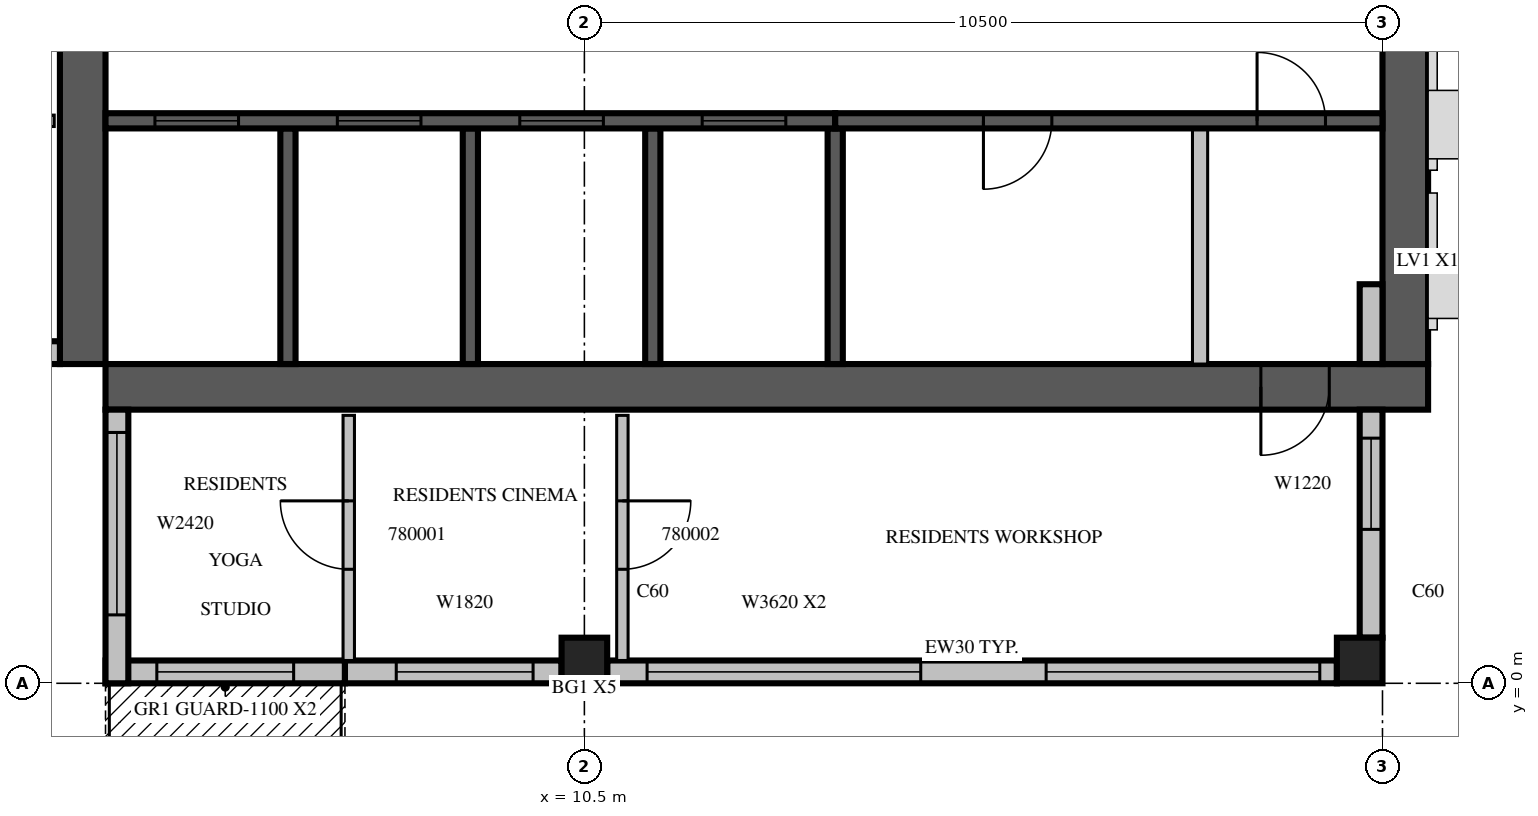
"""IFC4 building model, lengths in metres.
Left out: names, types, materials, properties, quantities, classifications, styles, units other than length and angle.
Written with IfcOpenShell. Run it as: python <this file> out.ifc"""

import sys

from ifc_helpers import new_model, si_unit, direction, frame, frame_2d, origin, origin_2d, place, context, subcontext, project, spatial, rectangle, extrude, source, transform, mapped, element, fill, save


model = new_model("IFC4")
c1 = context("Model", 3, precision=1e-05, world=origin(), true_north=direction((0.0, 1.0)))
c2 = subcontext(c1, "Body", "Model", "MODEL_VIEW")
j1 = project(units=[si_unit("LENGTHUNIT", "METRE"), si_unit("PLANEANGLEUNIT", "RADIAN")], contexts=[c1])
p1 = place(None, origin())
s1 = spatial("IfcSite", under=j1, at=p1, CompositionType="ELEMENT")
p2 = place(p1, origin())
s2 = spatial("IfcBuilding", under=s1, at=p2, CompositionType="ELEMENT")
p3 = place(p2, frame((0.0, 0.0, 340.5)))
s3 = spatial("IfcBuildingStorey", under=s2, at=p3, CompositionType="ELEMENT", Elevation=340.5)
m1 = source(origin(), c2, "Body", "SweptSolid", [
    extrude(rectangle(XDim=0.6, YDim=0.6, at=origin_2d()), origin(), (0.0, 0.0, 1.0), 3.5),
])
for number, where, z_axis, x_axis in (
    (1, (10.5, 0.3, 0.0), (0.0, 0.0, 1.0), (1.0, 0.0, 0.0)),
    (2, (20.7, 0.3, 0.0), (0.0, 0.0, 1.0), (1.0, 0.0, 0.0)),
):
    element("IfcColumn", number, at=place(p3, frame(where, z_axis=z_axis, x_axis=x_axis)), inside=s3, PredefinedType="COLUMN", context=c2, shape_type="MappedRepresentation", body=[
        mapped(m1, transform((0.0, 0.0, 0.0), scale=1.0)),
    ])
m2 = source(origin(), c2, "Body", "SweptSolid", [
    extrude(rectangle(XDim=17.4, YDim=0.6, at=frame_2d((8.7, 0.0))), origin(), (0.0, 0.0, 1.0), 3.5),
])
p4 = place(p3, frame((3.9, 4.2, 0.0), z_axis=(0.0, 0.0, 1.0), x_axis=(0.0, 1.0, 0.0)))
e3 = element("IfcWall", 3, at=p4, inside=s3, PredefinedType="SHEAR", context=c2, shape_type="MappedRepresentation", body=[
    mapped(m2, transform((0.0, 0.0, 0.0), scale=1.0)),
])
m3 = source(origin(), c2, "Body", "SweptSolid", [
    extrude(rectangle(XDim=2.2, YDim=2.1, at=frame_2d((1.1, 1.05))), frame((0.0, 0.31, 0.0), z_axis=(0.0, -1.0, 0.0), x_axis=(1.0, 0.0, 0.0)), (0.0, 0.0, 1.0), 0.62),
])
p5 = place(p4, frame((4.2, 0.0, 0.0)))
e4 = element("IfcOpeningElement", 4, at=p5, cuts=e3, PredefinedType="OPENING", context=c2, shape_type="MappedRepresentation", body=[
    mapped(m3, transform((0.0, 0.0, 0.0), scale=1.0)),
])
p6 = place(p3, frame((4.2, 3.9, 0.0), z_axis=(0.0, 0.0, 1.0), x_axis=(1.0, 0.0, 0.0)))
e5 = element("IfcWall", 5, at=p6, inside=s3, PredefinedType="SHEAR", context=c2, shape_type="MappedRepresentation", body=[
    mapped(m2, transform((0.0, 0.0, 0.0), scale=1.0)),
])
m4 = source(origin(), c2, "Body", "SweptSolid", [
    extrude(rectangle(XDim=0.9, YDim=2.1, at=frame_2d((0.45, 1.05))), frame((0.0, 0.31, 0.0), z_axis=(0.0, -1.0, 0.0), x_axis=(1.0, 0.0, 0.0)), (0.0, 0.0, 1.0), 0.62),
])
p7 = place(p6, frame((15.2, 0.0, 0.0)))
e6 = element("IfcOpeningElement", 6, at=p7, cuts=e5, PredefinedType="OPENING", context=c2, shape_type="MappedRepresentation", body=[
    mapped(m4, transform((0.0, 0.0, 0.0), scale=1.0)),
])
m5 = source(origin(), c2, "Body", "SweptSolid", [
    extrude(rectangle(XDim=16.8, YDim=0.6, at=frame_2d((8.4, 0.0))), origin(), (0.0, 0.0, 1.0), 3.5),
])
p8 = place(p3, frame((21.3, 4.2, 0.0), z_axis=(0.0, 0.0, 1.0), x_axis=(0.0, 1.0, 0.0)))
e7 = element("IfcWall", 7, at=p8, inside=s3, PredefinedType="SHEAR", context=c2, shape_type="MappedRepresentation", body=[
    mapped(m5, transform((0.0, 0.0, 0.0), scale=1.0)),
])
m6 = source(origin(), c2, "Body", "SweptSolid", [
    extrude(rectangle(XDim=1.2, YDim=2.4, at=frame_2d((0.6, 1.2))), frame((0.0, 0.31, 0.0), z_axis=(0.0, -1.0, 0.0), x_axis=(1.0, 0.0, 0.0)), (0.0, 0.0, 1.0), 0.62),
])
p9 = place(p8, frame((12.0, 0.0, 0.6)))
e8 = element("IfcOpeningElement", 8, at=p9, cuts=e7, PredefinedType="OPENING", context=c2, shape_type="MappedRepresentation", body=[
    mapped(m6, transform((0.0, 0.0, 0.0), scale=1.0)),
])
m7 = source(origin(), c2, "Body", "SweptSolid", [
    extrude(rectangle(XDim=3.15, YDim=0.3, at=frame_2d((1.575, 0.0))), origin(), (0.0, 0.0, 1.0), 3.1),
])
p10 = place(p3, frame((4.2, 0.15, 0.0), z_axis=(0.0, 0.0, 1.0), x_axis=(1.0, 0.0, 0.0)))
e9 = element("IfcWall", 9, at=p10, inside=s3, PredefinedType="STANDARD", context=c2, shape_type="MappedRepresentation", body=[
    mapped(m7, transform((0.0, 0.0, 0.0), scale=1.0)),
])
m8 = source(origin(), c2, "Body", "SweptSolid", [
    extrude(rectangle(XDim=1.8, YDim=2.4, at=frame_2d((0.9, 1.2))), frame((0.0, 0.16, 0.0), z_axis=(0.0, -1.0, 0.0), x_axis=(1.0, 0.0, 0.0)), (0.0, 0.0, 1.0), 0.32),
])
p11 = place(p10, frame((0.675, 0.0, 0.0)))
e10 = element("IfcOpeningElement", 10, at=p11, cuts=e9, PredefinedType="OPENING", context=c2, shape_type="MappedRepresentation", body=[
    mapped(m8, transform((0.0, 0.0, 0.0), scale=1.0)),
])
m9 = source(origin(), c2, "Body", "SweptSolid", [
    extrude(rectangle(XDim=2.85, YDim=0.3, at=frame_2d((1.425, 0.0))), origin(), (0.0, 0.0, 1.0), 3.1),
])
p12 = place(p3, frame((7.35, 0.15, 0.0), z_axis=(0.0, 0.0, 1.0), x_axis=(1.0, 0.0, 0.0)))
e11 = element("IfcWall", 11, at=p12, inside=s3, PredefinedType="STANDARD", context=c2, shape_type="MappedRepresentation", body=[
    mapped(m9, transform((0.0, 0.0, 0.0), scale=1.0)),
])
m10 = source(origin(), c2, "Body", "SweptSolid", [
    extrude(rectangle(XDim=1.8, YDim=2.0, at=frame_2d((0.9, 1.0))), frame((0.0, 0.16, 0.0), z_axis=(0.0, -1.0, 0.0), x_axis=(1.0, 0.0, 0.0)), (0.0, 0.0, 1.0), 0.32),
])
p13 = place(p12, frame((0.675, 0.0, 0.6)))
e12 = element("IfcOpeningElement", 12, at=p13, cuts=e11, PredefinedType="OPENING", context=c2, shape_type="MappedRepresentation", body=[
    mapped(m10, transform((0.0, 0.0, 0.0), scale=1.0)),
])
m11 = source(origin(), c2, "Body", "SweptSolid", [
    extrude(rectangle(XDim=9.6, YDim=0.3, at=frame_2d((4.8, 0.0))), origin(), (0.0, 0.0, 1.0), 3.1),
])
p14 = place(p3, frame((10.8, 0.15, 0.0), z_axis=(0.0, 0.0, 1.0), x_axis=(1.0, 0.0, 0.0)))
e13 = element("IfcWall", 13, at=p14, inside=s3, PredefinedType="STANDARD", context=c2, shape_type="MappedRepresentation", body=[
    mapped(m11, transform((0.0, 0.0, 0.0), scale=1.0)),
])
m12 = source(origin(), c2, "Body", "SweptSolid", [
    extrude(rectangle(XDim=3.6, YDim=2.0, at=frame_2d((1.8, 1.0))), frame((0.0, 0.16, 0.0), z_axis=(0.0, -1.0, 0.0), x_axis=(1.0, 0.0, 0.0)), (0.0, 0.0, 1.0), 0.32),
])
p15 = place(p14, frame((0.525, 0.0, 0.6)))
e14 = element("IfcOpeningElement", 14, at=p15, cuts=e13, PredefinedType="OPENING", context=c2, shape_type="MappedRepresentation", body=[
    mapped(m12, transform((0.0, 0.0, 0.0), scale=1.0)),
])
p16 = place(p14, frame((5.775, 0.0, 0.6)))
e15 = element("IfcOpeningElement", 15, at=p16, cuts=e13, PredefinedType="OPENING", context=c2, shape_type="MappedRepresentation", body=[
    mapped(m12, transform((0.0, 0.0, 0.0), scale=1.0)),
])
m13 = source(origin(), c2, "Body", "SweptSolid", [
    extrude(rectangle(XDim=3.0, YDim=0.3, at=frame_2d((1.5, 0.0))), origin(), (0.0, 0.0, 1.0), 3.1),
])
p17 = place(p3, frame((20.85, 0.6, 0.0), z_axis=(0.0, 0.0, 1.0), x_axis=(0.0, 1.0, 0.0)))
e16 = element("IfcWall", 16, at=p17, inside=s3, PredefinedType="STANDARD", context=c2, shape_type="MappedRepresentation", body=[
    mapped(m13, transform((0.0, 0.0, 0.0), scale=1.0)),
])
m14 = source(origin(), c2, "Body", "SweptSolid", [
    extrude(rectangle(XDim=1.2, YDim=2.0, at=frame_2d((0.6, 1.0))), frame((0.0, 0.16, 0.0), z_axis=(0.0, -1.0, 0.0), x_axis=(1.0, 0.0, 0.0)), (0.0, 0.0, 1.0), 0.32),
])
p18 = place(p17, frame((1.425, 0.0, 0.6)))
e17 = element("IfcOpeningElement", 17, at=p18, cuts=e16, PredefinedType="OPENING", context=c2, shape_type="MappedRepresentation", body=[
    mapped(m14, transform((0.0, 0.0, 0.0), scale=1.0)),
])
m15 = source(origin(), c2, "Body", "SweptSolid", [
    extrude(rectangle(XDim=1.05, YDim=0.3, at=frame_2d((0.525, 0.0))), origin(), (0.0, 0.0, 1.0), 3.1),
])
p19 = place(p3, frame((20.85, 4.2, 0.0), z_axis=(0.0, 0.0, 1.0), x_axis=(0.0, 1.0, 0.0)))
e18 = element("IfcWall", 18, at=p19, inside=s3, PredefinedType="STANDARD", context=c2, shape_type="MappedRepresentation", body=[
    mapped(m15, transform((0.0, 0.0, 0.0), scale=1.0)),
])
m16 = source(origin(), c2, "Body", "SweptSolid", [
    extrude(rectangle(XDim=3.6, YDim=0.3, at=frame_2d((1.8, 0.0))), origin(), (0.0, 0.0, 1.0), 3.1),
])
p20 = place(p3, frame((0.0, 4.35, 0.0), z_axis=(0.0, 0.0, 1.0), x_axis=(1.0, 0.0, 0.0)))
e19 = element("IfcWall", 19, at=p20, inside=s3, PredefinedType="STANDARD", context=c2, shape_type="MappedRepresentation", body=[
    mapped(m16, transform((0.0, 0.0, 0.0), scale=1.0)),
])
m17 = source(origin(), c2, "Body", "SweptSolid", [
    extrude(rectangle(XDim=2.4, YDim=2.0, at=frame_2d((1.2, 1.0))), frame((0.0, 0.16, 0.0), z_axis=(0.0, -1.0, 0.0), x_axis=(1.0, 0.0, 0.0)), (0.0, 0.0, 1.0), 0.32),
])
p21 = place(p20, frame((0.9, 0.0, 0.6)))
e20 = element("IfcOpeningElement", 20, at=p21, cuts=e19, PredefinedType="OPENING", context=c2, shape_type="MappedRepresentation", body=[
    mapped(m17, transform((0.0, 0.0, 0.0), scale=1.0)),
])
p22 = place(p3, frame((4.35, 3.6, 0.0), z_axis=(0.0, 0.0, 1.0), x_axis=(0.0, -1.0, 0.0)))
e21 = element("IfcWall", 21, at=p22, inside=s3, PredefinedType="STANDARD", context=c2, shape_type="MappedRepresentation", body=[
    mapped(m16, transform((0.0, 0.0, 0.0), scale=1.0)),
])
p23 = place(p22, frame((0.3, 0.0, 0.6)))
e22 = element("IfcOpeningElement", 22, at=p23, cuts=e21, PredefinedType="OPENING", context=c2, shape_type="MappedRepresentation", body=[
    mapped(m17, transform((0.0, 0.0, 0.0), scale=1.0)),
])
m18 = source(origin(), c2, "Body", "SweptSolid", [
    extrude(rectangle(XDim=3.1, YDim=0.2, at=frame_2d((1.55, 0.0))), origin(), (0.0, 0.0, 1.0), 3.5),
])
for number, where, z_axis, x_axis in (
    (23, (6.6, 4.2, 0.0), (0.0, 0.0, 1.0), (0.0, 1.0, 0.0)),
    (24, (9.0, 4.2, 0.0), (0.0, 0.0, 1.0), (0.0, 1.0, 0.0)),
    (25, (11.4, 4.2, 0.0), (0.0, 0.0, 1.0), (0.0, 1.0, 0.0)),
):
    element("IfcWall", number, at=place(p3, frame(where, z_axis=z_axis, x_axis=x_axis)), inside=s3, PredefinedType="SOLIDWALL", context=c2, shape_type="MappedRepresentation", body=[
        mapped(m18, transform((0.0, 0.0, 0.0), scale=1.0)),
    ])
m19 = source(origin(), c2, "Body", "SweptSolid", [
    extrude(rectangle(XDim=3.1, YDim=0.2, at=frame_2d((1.55, 0.0))), origin(), (0.0, 0.0, 1.0), 3.1),
])
p24 = place(p3, frame((13.8, 4.2, 0.0), z_axis=(0.0, 0.0, 1.0), x_axis=(0.0, 1.0, 0.0)))
e26 = element("IfcWall", 26, at=p24, inside=s3, PredefinedType="SOLIDWALL", context=c2, shape_type="MappedRepresentation", body=[
    mapped(m19, transform((0.0, 0.0, 0.0), scale=1.0)),
])
m20 = source(origin(), c2, "Body", "SweptSolid", [
    extrude(rectangle(XDim=3.1, YDim=0.2, at=frame_2d((1.55, 0.0))), origin(), (0.0, 0.0, 1.0), 3.1),
])
p25 = place(p3, frame((18.6, 4.2, 0.0), z_axis=(0.0, 0.0, 1.0), x_axis=(0.0, 1.0, 0.0)))
e27 = element("IfcWall", 27, at=p25, inside=s3, PredefinedType="PARTITIONING", context=c2, shape_type="MappedRepresentation", body=[
    mapped(m20, transform((0.0, 0.0, 0.0), scale=1.0)),
])
m21 = source(origin(), c2, "Body", "SweptSolid", [
    extrude(rectangle(XDim=9.6, YDim=0.2, at=frame_2d((4.8, 0.0))), origin(), (0.0, 0.0, 1.0), 3.5),
])
p26 = place(p3, frame((4.2, 7.4, 0.0), z_axis=(0.0, 0.0, 1.0), x_axis=(1.0, 0.0, 0.0)))
e28 = element("IfcWall", 28, at=p26, inside=s3, PredefinedType="SOLIDWALL", context=c2, shape_type="MappedRepresentation", body=[
    mapped(m21, transform((0.0, 0.0, 0.0), scale=1.0)),
])
m22 = source(origin(), c2, "Body", "SweptSolid", [
    extrude(rectangle(XDim=1.1, YDim=2.1, at=frame_2d((0.55, 1.05))), frame((0.0, 0.11, 0.0), z_axis=(0.0, -1.0, 0.0), x_axis=(1.0, 0.0, 0.0)), (0.0, 0.0, 1.0), 0.22),
])
p27 = place(p26, frame((0.65, 0.0, 0.0)))
e29 = element("IfcOpeningElement", 29, at=p27, cuts=e28, PredefinedType="OPENING", context=c2, shape_type="MappedRepresentation", body=[
    mapped(m22, transform((0.0, 0.0, 0.0), scale=1.0)),
])
p28 = place(p26, frame((3.05, 0.0, 0.0)))
e30 = element("IfcOpeningElement", 30, at=p28, cuts=e28, PredefinedType="OPENING", context=c2, shape_type="MappedRepresentation", body=[
    mapped(m22, transform((0.0, 0.0, 0.0), scale=1.0)),
])
p29 = place(p26, frame((5.45, 0.0, 0.0)))
e31 = element("IfcOpeningElement", 31, at=p29, cuts=e28, PredefinedType="OPENING", context=c2, shape_type="MappedRepresentation", body=[
    mapped(m22, transform((0.0, 0.0, 0.0), scale=1.0)),
])
p30 = place(p26, frame((7.85, 0.0, 0.0)))
e32 = element("IfcOpeningElement", 32, at=p30, cuts=e28, PredefinedType="OPENING", context=c2, shape_type="MappedRepresentation", body=[
    mapped(m22, transform((0.0, 0.0, 0.0), scale=1.0)),
])
m23 = source(origin(), c2, "Body", "SweptSolid", [
    extrude(rectangle(XDim=7.2, YDim=0.2, at=frame_2d((3.6, 0.0))), origin(), (0.0, 0.0, 1.0), 3.1),
])
p31 = place(p3, frame((13.8, 7.4, 0.0), z_axis=(0.0, 0.0, 1.0), x_axis=(1.0, 0.0, 0.0)))
e33 = element("IfcWall", 33, at=p31, inside=s3, PredefinedType="SOLIDWALL", context=c2, shape_type="MappedRepresentation", body=[
    mapped(m23, transform((0.0, 0.0, 0.0), scale=1.0)),
])
m24 = source(origin(), c2, "Body", "SweptSolid", [
    extrude(rectangle(XDim=0.9, YDim=2.1, at=frame_2d((0.45, 1.05))), frame((0.0, 0.11, 0.0), z_axis=(0.0, -1.0, 0.0), x_axis=(1.0, 0.0, 0.0)), (0.0, 0.0, 1.0), 0.22),
])
p32 = place(p31, frame((1.95, 0.0, 0.0)))
e34 = element("IfcOpeningElement", 34, at=p32, cuts=e33, PredefinedType="OPENING", context=c2, shape_type="MappedRepresentation", body=[
    mapped(m24, transform((0.0, 0.0, 0.0), scale=1.0)),
])
p33 = place(p31, frame((5.55, 0.0, 0.0)))
e35 = element("IfcOpeningElement", 35, at=p33, cuts=e33, PredefinedType="OPENING", context=c2, shape_type="MappedRepresentation", body=[
    mapped(m24, transform((0.0, 0.0, 0.0), scale=1.0)),
])
m25 = source(origin(), c2, "Body", "SweptSolid", [
    extrude(rectangle(XDim=3.225, YDim=0.15, at=frame_2d((1.613, 0.0))), origin(), (0.0, 0.0, 1.0), 3.1),
])
p34 = place(p3, frame((7.4, 3.525, 0.0), z_axis=(0.0, 0.0, 1.0), x_axis=(0.0, -1.0, 0.0)))
e36 = element("IfcWall", 36, at=p34, inside=s3, PredefinedType="PARTITIONING", context=c2, shape_type="MappedRepresentation", body=[
    mapped(m25, transform((0.0, 0.0, 0.0), scale=1.0)),
])
m26 = source(origin(), c2, "Body", "SweptSolid", [
    extrude(rectangle(XDim=0.9, YDim=2.1, at=frame_2d((0.45, 1.05))), frame((0.0, 0.085, 0.0), z_axis=(0.0, -1.0, 0.0), x_axis=(1.0, 0.0, 0.0)), (0.0, 0.0, 1.0), 0.17),
])
p35 = place(p34, frame((1.125, 0.0, 0.0)))
e37 = element("IfcOpeningElement", 37, at=p35, cuts=e36, PredefinedType="OPENING", context=c2, shape_type="MappedRepresentation", body=[
    mapped(m26, transform((0.0, 0.0, 0.0), scale=1.0)),
])
p36 = place(p3, frame((11.0, 3.525, 0.0), z_axis=(0.0, 0.0, 1.0), x_axis=(0.0, -1.0, 0.0)))
e38 = element("IfcWall", 38, at=p36, inside=s3, PredefinedType="PARTITIONING", context=c2, shape_type="MappedRepresentation", body=[
    mapped(m25, transform((0.0, 0.0, 0.0), scale=1.0)),
])
p37 = place(p36, frame((1.125, 0.0, 0.0)))
e39 = element("IfcOpeningElement", 39, at=p37, cuts=e38, PredefinedType="OPENING", context=c2, shape_type="MappedRepresentation", body=[
    mapped(m26, transform((0.0, 0.0, 0.0), scale=1.0)),
])
p38 = place(p3, frame((0.3, 7.4, 0.0), z_axis=(0.0, 0.0, 1.0), x_axis=(1.0, 0.0, 0.0)))
e40 = element("IfcWall", 40, at=p38, inside=s3, PredefinedType="PARTITIONING", context=c2, shape_type="MappedRepresentation", body=[
    mapped(m25, transform((0.0, 0.0, 0.0), scale=1.0)),
])
p39 = place(p38, frame((1.2, 0.0, 0.0)))
e41 = element("IfcOpeningElement", 41, at=p39, cuts=e40, PredefinedType="OPENING", context=c2, shape_type="MappedRepresentation", body=[
    mapped(m26, transform((0.0, 0.0, 0.0), scale=1.0)),
])
m27 = source(origin(), c2, "Body", "SweptSolid", [
    extrude(rectangle(XDim=1.8, YDim=2.4, at=frame_2d((0.9, 1.2))), frame((0.0, 0.025, 0.0), z_axis=(0.0, -1.0, 0.0), x_axis=(1.0, 0.0, 0.0)), (0.0, 0.0, 1.0), 0.05),
])
p40 = place(p11, origin())
e42 = element("IfcDoor", 42, at=p40, inside=s3, OperationType="SLIDING_TO_LEFT", PredefinedType="DOOR", context=c2, shape_type="MappedRepresentation", body=[
    mapped(m27, transform((0.0, 0.0, 0.0), scale=1.0)),
])
fill(e10, e42)
m28 = source(origin(), c2, "Body", "SweptSolid", [
    extrude(rectangle(XDim=1.8, YDim=2.0, at=frame_2d((0.9, 1.0))), frame((0.0, 0.03, 0.0), z_axis=(0.0, -1.0, 0.0), x_axis=(1.0, 0.0, 0.0)), (0.0, 0.0, 1.0), 0.06),
])
p41 = place(p13, origin())
e43 = element("IfcWindow", 43, at=p41, inside=s3, PartitioningType="SINGLE_PANEL", PredefinedType="WINDOW", context=c2, shape_type="MappedRepresentation", body=[
    mapped(m28, transform((0.0, 0.0, 0.0), scale=1.0)),
])
fill(e12, e43)
m29 = source(origin(), c2, "Body", "SweptSolid", [
    extrude(rectangle(XDim=3.6, YDim=2.0, at=frame_2d((1.8, 1.0))), frame((0.0, 0.03, 0.0), z_axis=(0.0, -1.0, 0.0), x_axis=(1.0, 0.0, 0.0)), (0.0, 0.0, 1.0), 0.06),
])
p42 = place(p15, origin())
e44 = element("IfcWindow", 44, at=p42, inside=s3, PartitioningType="SINGLE_PANEL", PredefinedType="WINDOW", context=c2, shape_type="MappedRepresentation", body=[
    mapped(m29, transform((0.0, 0.0, 0.0), scale=1.0)),
])
fill(e14, e44)
p43 = place(p16, origin())
e45 = element("IfcWindow", 45, at=p43, inside=s3, PartitioningType="SINGLE_PANEL", PredefinedType="WINDOW", context=c2, shape_type="MappedRepresentation", body=[
    mapped(m29, transform((0.0, 0.0, 0.0), scale=1.0)),
])
fill(e15, e45)
m30 = source(origin(), c2, "Body", "SweptSolid", [
    extrude(rectangle(XDim=1.2, YDim=2.0, at=frame_2d((0.6, 1.0))), frame((0.0, 0.03, 0.0), z_axis=(0.0, -1.0, 0.0), x_axis=(1.0, 0.0, 0.0)), (0.0, 0.0, 1.0), 0.06),
])
p44 = place(p18, origin())
e46 = element("IfcWindow", 46, at=p44, inside=s3, PartitioningType="SINGLE_PANEL", PredefinedType="WINDOW", context=c2, shape_type="MappedRepresentation", body=[
    mapped(m30, transform((0.0, 0.0, 0.0), scale=1.0)),
])
fill(e17, e46)
m31 = source(origin(), c2, "Body", "SweptSolid", [
    extrude(rectangle(XDim=2.4, YDim=2.0, at=frame_2d((1.2, 1.0))), frame((0.0, 0.03, 0.0), z_axis=(0.0, -1.0, 0.0), x_axis=(1.0, 0.0, 0.0)), (0.0, 0.0, 1.0), 0.06),
])
p45 = place(p23, origin())
e47 = element("IfcWindow", 47, at=p45, inside=s3, PartitioningType="SINGLE_PANEL", PredefinedType="WINDOW", context=c2, shape_type="MappedRepresentation", body=[
    mapped(m31, transform((0.0, 0.0, 0.0), scale=1.0)),
])
fill(e22, e47)
m32 = source(origin(), c2, "Body", "SweptSolid", [
    extrude(rectangle(XDim=1.1, YDim=2.1, at=frame_2d((0.55, 1.05))), frame((0.0, 0.025, 0.0), z_axis=(0.0, -1.0, 0.0), x_axis=(1.0, 0.0, 0.0)), (0.0, 0.0, 1.0), 0.05),
])
p46 = place(p27, origin())
e48 = element("IfcDoor", 48, at=p46, inside=s3, OperationType="SLIDING_TO_LEFT", PredefinedType="DOOR", context=c2, shape_type="MappedRepresentation", body=[
    mapped(m32, transform((0.0, 0.0, 0.0), scale=1.0)),
])
fill(e29, e48)
p47 = place(p28, origin())
e49 = element("IfcDoor", 49, at=p47, inside=s3, OperationType="SLIDING_TO_LEFT", PredefinedType="DOOR", context=c2, shape_type="MappedRepresentation", body=[
    mapped(m32, transform((0.0, 0.0, 0.0), scale=1.0)),
])
fill(e30, e49)
p48 = place(p29, origin())
e50 = element("IfcDoor", 50, at=p48, inside=s3, OperationType="SLIDING_TO_LEFT", PredefinedType="DOOR", context=c2, shape_type="MappedRepresentation", body=[
    mapped(m32, transform((0.0, 0.0, 0.0), scale=1.0)),
])
fill(e31, e50)
p49 = place(p30, origin())
e51 = element("IfcDoor", 51, at=p49, inside=s3, OperationType="SLIDING_TO_LEFT", PredefinedType="DOOR", context=c2, shape_type="MappedRepresentation", body=[
    mapped(m32, transform((0.0, 0.0, 0.0), scale=1.0)),
])
fill(e32, e51)
m33 = source(origin(), c2, "Body", "SweptSolid", [
    extrude(rectangle(XDim=0.9, YDim=2.1, at=frame_2d((0.45, 1.05))), frame((0.0, 0.025, 0.0), z_axis=(0.0, -1.0, 0.0), x_axis=(1.0, 0.0, 0.0)), (0.0, 0.0, 1.0), 0.05),
])
p50 = place(p32, origin())
e52 = element("IfcDoor", 52, at=p50, inside=s3, OperationType="SINGLE_SWING_RIGHT", PredefinedType="DOOR", context=c2, shape_type="MappedRepresentation", body=[
    mapped(m33, transform((0.0, 0.0, 0.0), scale=1.0)),
])
fill(e34, e52)
p51 = place(p33, origin())
e53 = element("IfcDoor", 53, at=p51, inside=s3, OperationType="SINGLE_SWING_LEFT", PredefinedType="DOOR", context=c2, shape_type="MappedRepresentation", body=[
    mapped(m33, transform((0.0, 0.0, 0.0), scale=1.0)),
])
fill(e35, e53)
p52 = place(p7, origin())
e54 = element("IfcDoor", 54, at=p52, inside=s3, OperationType="SINGLE_SWING_RIGHT", PredefinedType="DOOR", context=c2, shape_type="MappedRepresentation", body=[
    mapped(m33, transform((0.0, 0.0, 0.0), scale=1.0)),
])
fill(e6, e54)
p53 = place(p35, origin())
e55 = element("IfcDoor", 55, at=p53, inside=s3, OperationType="SINGLE_SWING_RIGHT", PredefinedType="DOOR", context=c2, shape_type="MappedRepresentation", body=[
    mapped(m33, transform((0.0, 0.0, 0.0), scale=1.0)),
])
fill(e37, e55)
p54 = place(p37, origin())
e56 = element("IfcDoor", 56, at=p54, inside=s3, OperationType="SINGLE_SWING_LEFT", PredefinedType="DOOR", context=c2, shape_type="MappedRepresentation", body=[
    mapped(m33, transform((0.0, 0.0, 0.0), scale=1.0)),
])
fill(e39, e56)
save(model, sys.argv[1])
